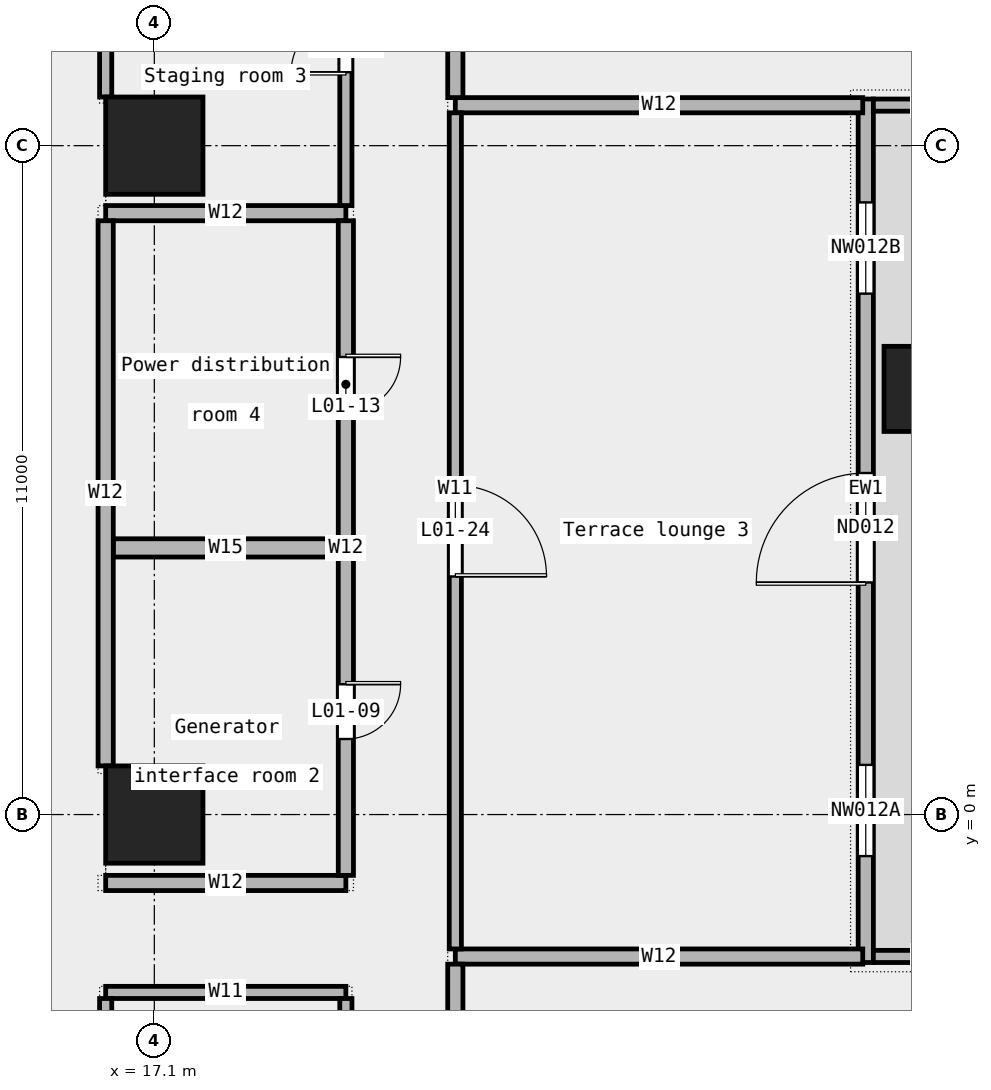
"""IFC4 building model, lengths in metres.
Left out: names, types, materials, properties, quantities, classifications, styles, units other than length and angle.
Written with IfcOpenShell. Run it as: python <this file> out.ifc"""

import sys

from ifc_helpers import new_model, si_unit, direction, frame, frame_2d, origin, origin_2d, place, context, subcontext, project, spatial, rectangle, extrude, element, fill, save


model = new_model("IFC4")
c1 = context("Model", 3, precision=1e-05, world=origin(), true_north=direction((0.0, 1.0)))
c2 = subcontext(c1, "Body", "Model", "MODEL_VIEW")
j1 = project(units=[si_unit("LENGTHUNIT", "METRE"), si_unit("PLANEANGLEUNIT", "RADIAN")], contexts=[c1])
p1 = place(None, origin())
s1 = spatial("IfcSite", under=j1, at=p1, CompositionType="ELEMENT")
p2 = place(p1, origin())
s2 = spatial("IfcBuilding", under=s1, at=p2, CompositionType="ELEMENT")
p3 = place(p2, frame((0.0, 0.0, 9.0)))
s3 = spatial("IfcBuildingStorey", under=s2, at=p3, CompositionType="ELEMENT", Elevation=9.0)
p4 = place(p3, frame((29.8, 7.0, 0.0), z_axis=(0.0, 0.0, 1.0), x_axis=(1.0, 0.0, 0.0)))
e1 = element("IfcColumn", 1, at=p4, inside=s3, PredefinedType="COLUMN", context=c2, shape_type="SweptSolid", body=[
    extrude(rectangle(XDim=1.4, YDim=1.4, at=origin_2d()), origin(), (0.0, 0.0, 1.0), 5.0),
])
for number, where, z_axis, x_axis in (
    (2, (17.1, 0.0, 0.0), (0.0, 0.0, 1.0), (1.0, 0.0, 0.0)),
    (3, (17.1, 11.0, 0.0), (0.0, 0.0, 1.0), (1.0, 0.0, 0.0)),
):
    element("IfcColumn", number, at=place(p3, frame(where, z_axis=z_axis, x_axis=x_axis)), inside=s3, PredefinedType="COLUMN", context=c2, shape_type="SweptSolid", body=[
        extrude(rectangle(XDim=1.6, YDim=1.6, at=origin_2d()), origin(), (0.0, 0.0, 1.0), 5.0),
    ])
p5 = place(p3, frame((28.8, -2.433, 0.0), z_axis=(0.0, 0.0, 1.0), x_axis=(0.0, 1.0, 0.0)))
e4 = element("IfcWall", 4, at=p5, inside=s3, PredefinedType="STANDARD", context=c2, shape_type="SweptSolid", body=[
    extrude(rectangle(XDim=14.2, YDim=0.25, at=frame_2d((7.1, 0.0))), origin(), (0.0, 0.0, 1.0), 5.0),
])
p6 = place(p5, frame((1.75, 0.0, 0.45)))
e5 = element("IfcOpeningElement", 5, at=p6, cuts=e4, PredefinedType="OPENING", context=c2, shape_type="SweptSolid", body=[
    extrude(rectangle(XDim=1.5, YDim=3.0, at=frame_2d((0.75, 1.5))), frame((0.0, 0.137, 0.0), z_axis=(0.0, -1.0, 0.0), x_axis=(1.0, 0.0, 0.0)), (0.0, 0.0, 1.0), 0.274),
])
p7 = place(p5, frame((6.25, 0.0, 0.0)))
e6 = element("IfcOpeningElement", 6, at=p7, cuts=e4, PredefinedType="OPENING", context=c2, shape_type="SweptSolid", body=[
    extrude(rectangle(XDim=1.8, YDim=2.4, at=frame_2d((0.9, 1.2))), frame((0.0, 0.137, 0.0), z_axis=(0.0, -1.0, 0.0), x_axis=(1.0, 0.0, 0.0)), (0.0, 0.0, 1.0), 0.274),
])
p8 = place(p5, frame((11.0, 0.0, 0.45)))
e7 = element("IfcOpeningElement", 7, at=p8, cuts=e4, PredefinedType="OPENING", context=c2, shape_type="SweptSolid", body=[
    extrude(rectangle(XDim=1.5, YDim=3.0, at=frame_2d((0.75, 1.5))), frame((0.0, 0.137, 0.0), z_axis=(0.0, -1.0, 0.0), x_axis=(1.0, 0.0, 0.0)), (0.0, 0.0, 1.0), 0.274),
])
for number, where, z_axis, x_axis in (
    (8, (30.8, -2.333, 0.0), (0.0, 0.0, 1.0), (-1.0, 0.0, 0.0)),
    (9, (30.8, 11.667, 0.0), (0.0, 0.0, 1.0), (-1.0, 0.0, 0.0)),
):
    element("IfcWall", number, at=place(p3, frame(where, z_axis=z_axis, x_axis=x_axis)), inside=s3, PredefinedType="STANDARD", context=c2, shape_type="SweptSolid", body=[
        extrude(rectangle(XDim=1.875, YDim=0.2, at=frame_2d((0.938, 0.0))), origin(), (0.0, 0.0, 1.0), 5.0),
    ])
p9 = place(p3, frame((16.3, -2.925, 0.0), z_axis=(0.0, 0.0, 1.0), x_axis=(1.0, 0.0, 0.0)))
e10 = element("IfcWall", 10, at=p9, inside=s3, PredefinedType="PARTITIONING", context=c2, shape_type="SweptSolid", body=[
    extrude(rectangle(XDim=3.95, YDim=0.2, at=frame_2d((1.975, 0.0))), origin(), (0.0, 0.0, 1.0), 5.0),
])
p10 = place(p3, frame((22.05, -2.335, 0.0), z_axis=(0.0, 0.0, 1.0), x_axis=(1.0, 0.0, 0.0)))
e11 = element("IfcWall", 11, at=p10, inside=s3, PredefinedType="PARTITIONING", context=c2, shape_type="SweptSolid", body=[
    extrude(rectangle(XDim=6.7, YDim=0.25, at=frame_2d((3.35, 0.0))), origin(), (0.0, 0.0, 1.0), 5.0),
])
p11 = place(p3, frame((16.3, -1.125, 0.0), z_axis=(0.0, 0.0, 1.0), x_axis=(1.0, 0.0, 0.0)))
e12 = element("IfcWall", 12, at=p11, inside=s3, PredefinedType="PARTITIONING", context=c2, shape_type="SweptSolid", body=[
    extrude(rectangle(XDim=3.95, YDim=0.25, at=frame_2d((1.975, 0.0))), origin(), (0.0, 0.0, 1.0), 5.0),
])
p12 = place(p3, frame((16.425, 4.385, 0.0), z_axis=(0.0, 0.0, 1.0), x_axis=(1.0, 0.0, 0.0)))
e13 = element("IfcWall", 13, at=p12, inside=s3, PredefinedType="PARTITIONING", context=c2, shape_type="SweptSolid", body=[
    extrude(rectangle(XDim=3.7, YDim=0.3, at=frame_2d((1.85, 0.0))), origin(), (0.0, 0.0, 1.0), 5.0),
])
p13 = place(p3, frame((16.3, 9.89, 0.0), z_axis=(0.0, 0.0, 1.0), x_axis=(1.0, 0.0, 0.0)))
e14 = element("IfcWall", 14, at=p13, inside=s3, PredefinedType="PARTITIONING", context=c2, shape_type="SweptSolid", body=[
    extrude(rectangle(XDim=3.95, YDim=0.25, at=frame_2d((1.975, 0.0))), origin(), (0.0, 0.0, 1.0), 5.0),
])
p14 = place(p3, frame((22.05, 11.665, 0.0), z_axis=(0.0, 0.0, 1.0), x_axis=(1.0, 0.0, 0.0)))
e15 = element("IfcWall", 15, at=p14, inside=s3, PredefinedType="PARTITIONING", context=c2, shape_type="SweptSolid", body=[
    extrude(rectangle(XDim=6.7, YDim=0.25, at=frame_2d((3.35, 0.0))), origin(), (0.0, 0.0, 1.0), 5.0),
])
p15 = place(p3, frame((16.3, -9.0, 0.0), z_axis=(0.0, 0.0, 1.0), x_axis=(0.0, 1.0, 0.0)))
e16 = element("IfcWall", 16, at=p15, inside=s3, PredefinedType="PARTITIONING", context=c2, shape_type="SweptSolid", body=[
    extrude(rectangle(XDim=5.975, YDim=0.2, at=frame_2d((2.988, 0.0))), origin(), (0.0, 0.0, 1.0), 5.0),
])
p16 = place(p3, frame((16.3, 11.8, 0.0), z_axis=(0.0, 0.0, 1.0), x_axis=(0.0, 1.0, 0.0)))
e17 = element("IfcWall", 17, at=p16, inside=s3, PredefinedType="PARTITIONING", context=c2, shape_type="SweptSolid", body=[
    extrude(rectangle(XDim=3.5, YDim=0.2, at=frame_2d((1.75, 0.0))), origin(), (0.0, 0.0, 1.0), 5.0),
])
p17 = place(p3, frame((16.3, 0.8, 0.0), z_axis=(0.0, 0.0, 1.0), x_axis=(0.0, 1.0, 0.0)))
e18 = element("IfcWall", 18, at=p17, inside=s3, PredefinedType="PARTITIONING", context=c2, shape_type="SweptSolid", body=[
    extrude(rectangle(XDim=8.965, YDim=0.25, at=frame_2d((4.482, 0.0))), origin(), (0.0, 0.0, 1.0), 5.0),
])
p18 = place(p3, frame((20.25, -9.0, 0.0), z_axis=(0.0, 0.0, 1.0), x_axis=(0.0, 1.0, 0.0)))
e19 = element("IfcWall", 19, at=p18, inside=s3, PredefinedType="PARTITIONING", context=c2, shape_type="SweptSolid", body=[
    extrude(rectangle(XDim=5.975, YDim=0.2, at=frame_2d((2.988, 0.0))), origin(), (0.0, 0.0, 1.0), 5.0),
])
p19 = place(p18, frame((2.538, 0.0, 0.0)))
e20 = element("IfcOpeningElement", 20, at=p19, cuts=e19, PredefinedType="OPENING", context=c2, shape_type="SweptSolid", body=[
    extrude(rectangle(XDim=0.9, YDim=2.1, at=frame_2d((0.45, 1.05))), frame((0.0, 0.112, 0.0), z_axis=(0.0, -1.0, 0.0), x_axis=(1.0, 0.0, 0.0)), (0.0, 0.0, 1.0), 0.224),
])
p20 = place(p3, frame((20.25, 10.015, 0.0), z_axis=(0.0, 0.0, 1.0), x_axis=(0.0, 1.0, 0.0)))
e21 = element("IfcWall", 21, at=p20, inside=s3, PredefinedType="PARTITIONING", context=c2, shape_type="SweptSolid", body=[
    extrude(rectangle(XDim=5.285, YDim=0.2, at=frame_2d((2.643, 0.0))), origin(), (0.0, 0.0, 1.0), 5.0),
])
p21 = place(p20, frame((2.192, 0.0, 0.0)))
e22 = element("IfcOpeningElement", 22, at=p21, cuts=e21, PredefinedType="OPENING", context=c2, shape_type="SweptSolid", body=[
    extrude(rectangle(XDim=0.9, YDim=2.1, at=frame_2d((0.45, 1.05))), frame((0.0, 0.112, 0.0), z_axis=(0.0, -1.0, 0.0), x_axis=(1.0, 0.0, 0.0)), (0.0, 0.0, 1.0), 0.224),
])
p22 = place(p3, frame((20.25, -1.0, 0.0), z_axis=(0.0, 0.0, 1.0), x_axis=(0.0, 1.0, 0.0)))
e23 = element("IfcWall", 23, at=p22, inside=s3, PredefinedType="PARTITIONING", context=c2, shape_type="SweptSolid", body=[
    extrude(rectangle(XDim=10.765, YDim=0.25, at=frame_2d((5.382, 0.0))), origin(), (0.0, 0.0, 1.0), 5.0),
])
p23 = place(p22, frame((2.242, 0.0, 0.0)))
e24 = element("IfcOpeningElement", 24, at=p23, cuts=e23, PredefinedType="OPENING", context=c2, shape_type="SweptSolid", body=[
    extrude(rectangle(XDim=0.9, YDim=2.1, at=frame_2d((0.45, 1.05))), frame((0.0, 0.137, 0.0), z_axis=(0.0, -1.0, 0.0), x_axis=(1.0, 0.0, 0.0)), (0.0, 0.0, 1.0), 0.274),
])
p24 = place(p22, frame((7.625, 0.0, 0.0)))
e25 = element("IfcOpeningElement", 25, at=p24, cuts=e23, PredefinedType="OPENING", context=c2, shape_type="SweptSolid", body=[
    extrude(rectangle(XDim=0.9, YDim=2.1, at=frame_2d((0.45, 1.05))), frame((0.0, 0.137, 0.0), z_axis=(0.0, -1.0, 0.0), x_axis=(1.0, 0.0, 0.0)), (0.0, 0.0, 1.0), 0.274),
])
p25 = place(p3, frame((22.05, -2.21, 0.0), z_axis=(0.0, 0.0, 1.0), x_axis=(0.0, 1.0, 0.0)))
e26 = element("IfcWall", 26, at=p25, inside=s3, PredefinedType="PARTITIONING", context=c2, shape_type="SweptSolid", body=[
    extrude(rectangle(XDim=13.75, YDim=0.2, at=frame_2d((6.875, 0.0))), origin(), (0.0, 0.0, 1.0), 5.0),
])
p26 = place(p25, frame((6.125, 0.0, 0.0)))
e27 = element("IfcOpeningElement", 27, at=p26, cuts=e26, PredefinedType="OPENING", context=c2, shape_type="SweptSolid", body=[
    extrude(rectangle(XDim=1.5, YDim=2.1, at=frame_2d((0.75, 1.05))), frame((0.0, 0.112, 0.0), z_axis=(0.0, -1.0, 0.0), x_axis=(1.0, 0.0, 0.0)), (0.0, 0.0, 1.0), 0.224),
])
p27 = place(p3, frame((22.05, -8.975, 0.0), z_axis=(0.0, 0.0, 1.0), x_axis=(0.0, 1.0, 0.0)))
e28 = element("IfcWall", 28, at=p27, inside=s3, PredefinedType="PARTITIONING", context=c2, shape_type="SweptSolid", body=[
    extrude(rectangle(XDim=6.515, YDim=0.25, at=frame_2d((3.258, 0.0))), origin(), (0.0, 0.0, 1.0), 5.0),
])
p28 = place(p27, frame((2.657, 0.0, 0.0)))
e29 = element("IfcOpeningElement", 29, at=p28, cuts=e28, PredefinedType="OPENING", context=c2, shape_type="SweptSolid", body=[
    extrude(rectangle(XDim=1.2, YDim=2.1, at=frame_2d((0.6, 1.05))), frame((0.0, 0.137, 0.0), z_axis=(0.0, -1.0, 0.0), x_axis=(1.0, 0.0, 0.0)), (0.0, 0.0, 1.0), 0.274),
])
p29 = place(p3, frame((22.05, 11.79, 0.0), z_axis=(0.0, 0.0, 1.0), x_axis=(0.0, 1.0, 0.0)))
e30 = element("IfcWall", 30, at=p29, inside=s3, PredefinedType="PARTITIONING", context=c2, shape_type="SweptSolid", body=[
    extrude(rectangle(XDim=3.485, YDim=0.25, at=frame_2d((1.742, 0.0))), origin(), (0.0, 0.0, 1.0), 5.0),
])
p30 = place(p29, frame((1.143, 0.0, 0.0)))
e31 = element("IfcOpeningElement", 31, at=p30, cuts=e30, PredefinedType="OPENING", context=c2, shape_type="SweptSolid", body=[
    extrude(rectangle(XDim=1.2, YDim=2.1, at=frame_2d((0.6, 1.05))), frame((0.0, 0.137, 0.0), z_axis=(0.0, -1.0, 0.0), x_axis=(1.0, 0.0, 0.0)), (0.0, 0.0, 1.0), 0.274),
])
p31 = place(p6, origin())
e32 = element("IfcWindow", 32, at=p31, inside=s3, PartitioningType="SINGLE_PANEL", PredefinedType="WINDOW", context=c2, shape_type="SweptSolid", body=[
    extrude(rectangle(XDim=1.5, YDim=3.0, at=frame_2d((0.75, 1.5))), frame((0.0, 0.03, 0.0), z_axis=(0.0, -1.0, 0.0), x_axis=(1.0, 0.0, 0.0)), (0.0, 0.0, 1.0), 0.06),
])
fill(e5, e32)
p32 = place(p7, origin())
e33 = element("IfcDoor", 33, at=p32, inside=s3, OperationType="DOUBLE_DOOR_SINGLE_SWING", PredefinedType="DOOR", context=c2, shape_type="SweptSolid", body=[
    extrude(rectangle(XDim=1.8, YDim=2.4, at=frame_2d((0.9, 1.2))), frame((0.0, 0.025, 0.0), z_axis=(0.0, -1.0, 0.0), x_axis=(1.0, 0.0, 0.0)), (0.0, 0.0, 1.0), 0.05),
])
fill(e6, e33)
p33 = place(p8, origin())
e34 = element("IfcWindow", 34, at=p33, inside=s3, PartitioningType="SINGLE_PANEL", PredefinedType="WINDOW", context=c2, shape_type="SweptSolid", body=[
    extrude(rectangle(XDim=1.5, YDim=3.0, at=frame_2d((0.75, 1.5))), frame((0.0, 0.03, 0.0), z_axis=(0.0, -1.0, 0.0), x_axis=(1.0, 0.0, 0.0)), (0.0, 0.0, 1.0), 0.06),
])
fill(e7, e34)
p34 = place(p23, origin())
e35 = element("IfcDoor", 35, at=p34, inside=s3, OperationType="SINGLE_SWING_LEFT", PredefinedType="DOOR", context=c2, shape_type="SweptSolid", body=[
    extrude(rectangle(XDim=0.9, YDim=2.1, at=frame_2d((0.45, 1.05))), frame((0.0, 0.025, 0.0), z_axis=(0.0, -1.0, 0.0), x_axis=(1.0, 0.0, 0.0)), (0.0, 0.0, 1.0), 0.05),
])
fill(e24, e35)
p35 = place(p24, origin())
e36 = element("IfcDoor", 36, at=p35, inside=s3, OperationType="SINGLE_SWING_LEFT", PredefinedType="DOOR", context=c2, shape_type="SweptSolid", body=[
    extrude(rectangle(XDim=0.9, YDim=2.1, at=frame_2d((0.45, 1.05))), frame((0.0, 0.025, 0.0), z_axis=(0.0, -1.0, 0.0), x_axis=(1.0, 0.0, 0.0)), (0.0, 0.0, 1.0), 0.05),
])
fill(e25, e36)
p36 = place(p21, origin())
e37 = element("IfcDoor", 37, at=p36, inside=s3, OperationType="SINGLE_SWING_LEFT", PredefinedType="DOOR", context=c2, shape_type="SweptSolid", body=[
    extrude(rectangle(XDim=0.9, YDim=2.1, at=frame_2d((0.45, 1.05))), frame((0.0, 0.025, 0.0), z_axis=(0.0, -1.0, 0.0), x_axis=(1.0, 0.0, 0.0)), (0.0, 0.0, 1.0), 0.05),
])
fill(e22, e37)
p37 = place(p26, origin())
e38 = element("IfcDoor", 38, at=p37, inside=s3, OperationType="DOUBLE_DOOR_SINGLE_SWING", PredefinedType="DOOR", context=c2, shape_type="SweptSolid", body=[
    extrude(rectangle(XDim=1.5, YDim=2.1, at=frame_2d((0.75, 1.05))), frame((0.0, 0.025, 0.0), z_axis=(0.0, -1.0, 0.0), x_axis=(1.0, 0.0, 0.0)), (0.0, 0.0, 1.0), 0.05),
])
fill(e27, e38)
save(model, sys.argv[1])
